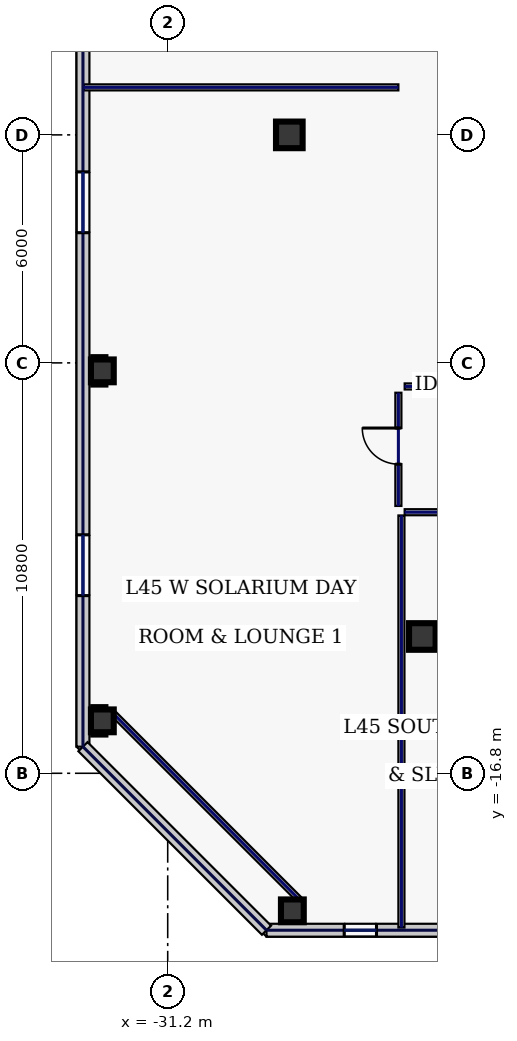
"""IFC4 building model, lengths in metres.
Left out: names, types, materials, properties, quantities, classifications, styles, units other than length and angle.
Written with IfcOpenShell. Run it as: python <this file> out.ifc"""

import sys

from ifc_helpers import new_model, si_unit, direction, frame, frame_2d, origin, origin_2d, place, context, subcontext, project, spatial, rectangle, hollow_rectangle, extrude, element, fill, save


model = new_model("IFC4")
c1 = context("Model", 3, precision=1e-05, world=origin(), true_north=direction((0.0, 1.0)))
c2 = subcontext(c1, "Body", "Model", "MODEL_VIEW")
j1 = project(units=[si_unit("LENGTHUNIT", "METRE"), si_unit("PLANEANGLEUNIT", "RADIAN")], contexts=[c1])
p1 = place(None, origin())
s1 = spatial("IfcSite", under=j1, at=p1, CompositionType="ELEMENT")
p2 = place(p1, origin())
s2 = spatial("IfcBuilding", under=s1, at=p2, CompositionType="ELEMENT")
p3 = place(p2, frame((0.0, 0.0, 196.2)))
s3 = spatial("IfcBuildingStorey", under=s2, at=p3, CompositionType="ELEMENT", Elevation=196.2)
for number, where, z_axis, x_axis in (
    (1, (-24.5, -13.2, 0.0), (0.0, 0.0, 1.0), (1.0, 0.0, 0.0)),
    (2, (-28.0, 0.0, 0.0), (0.0, 0.0, 1.0), (1.0, 0.0, 0.0)),
):
    element("IfcColumn", number, at=place(p3, frame(where, z_axis=z_axis, x_axis=x_axis)), inside=s3, PredefinedType="COLUMN", context=c2, shape_type="SweptSolid", body=[
        extrude(hollow_rectangle(XDim=0.7, YDim=0.7, WallThickness=0.032, at=origin_2d()), origin(), (0.0, 0.0, 1.0), 3.74),
    ])
for number, where, z_axis, x_axis in (
    (3, (-27.92, -20.42, 0.0), (0.0, 0.0, 1.0), (1.0, 0.0, 0.0)),
    (4, (-32.92, -6.21, 0.0), (0.0, 0.0, 1.0), (1.0, 0.0, 0.0)),
    (5, (-32.92, -15.42, 0.0), (0.0, 0.0, 1.0), (1.0, 0.0, 0.0)),
):
    element("IfcColumn", number, at=place(p3, frame(where, z_axis=z_axis, x_axis=x_axis)), inside=s3, PredefinedType="COLUMN", context=c2, shape_type="SweptSolid", body=[
        extrude(hollow_rectangle(XDim=0.6, YDim=0.6, WallThickness=0.028, at=origin_2d()), origin(), (0.0, 0.0, 1.0), 3.74),
    ])
p4 = place(p3, frame((-28.6, -20.93, 0.0), z_axis=(0.0, 0.0, 1.0), x_axis=(1.0, 0.0, 0.0)))
e6 = element("IfcWall", 6, at=p4, inside=s3, PredefinedType="STANDARD", context=c2, shape_type="SweptSolid", body=[
    extrude(rectangle(XDim=19.937, YDim=0.34, at=frame_2d((9.969, 0.0))), origin(), (0.0, 0.0, 1.0), 3.74),
])
p5 = place(p4, frame((2.044, 0.0, 0.8)))
e7 = element("IfcOpeningElement", 7, at=p5, cuts=e6, PredefinedType="OPENING", context=c2, shape_type="SweptSolid", body=[
    extrude(rectangle(XDim=0.85, YDim=1.85, at=frame_2d((0.425, 0.925))), frame((0.0, 0.18, 0.0), z_axis=(0.0, -1.0, 0.0), x_axis=(1.0, 0.0, 0.0)), (0.0, 0.0, 1.0), 0.36),
])
p6 = place(p4, frame((6.029, 0.0, 0.8)))
e8 = element("IfcOpeningElement", 8, at=p6, cuts=e6, PredefinedType="OPENING", context=c2, shape_type="SweptSolid", body=[
    extrude(rectangle(XDim=0.85, YDim=1.85, at=frame_2d((0.425, 0.925))), frame((0.0, 0.18, 0.0), z_axis=(0.0, -1.0, 0.0), x_axis=(1.0, 0.0, 0.0)), (0.0, 0.0, 1.0), 0.36),
])
p7 = place(p4, frame((10.707, 0.0, 0.8)))
e9 = element("IfcOpeningElement", 9, at=p7, cuts=e6, PredefinedType="OPENING", context=c2, shape_type="SweptSolid", body=[
    extrude(rectangle(XDim=1.95, YDim=2.1, at=frame_2d((0.975, 1.05))), frame((0.0, 0.18, 0.0), z_axis=(0.0, -1.0, 0.0), x_axis=(1.0, 0.0, 0.0)), (0.0, 0.0, 1.0), 0.36),
])
p8 = place(p3, frame((-33.43, 22.1, 0.0), z_axis=(0.0, 0.0, 1.0), x_axis=(0.0, -1.0, 0.0)))
e10 = element("IfcWall", 10, at=p8, inside=s3, PredefinedType="STANDARD", context=c2, shape_type="SweptSolid", body=[
    extrude(rectangle(XDim=38.2, YDim=0.34, at=frame_2d((19.1, 0.0))), origin(), (0.0, 0.0, 1.0), 3.74),
])
p9 = place(p8, frame((3.975, 0.0, 0.58)))
e11 = element("IfcOpeningElement", 11, at=p9, cuts=e10, PredefinedType="OPENING", context=c2, shape_type="SweptSolid", body=[
    extrude(rectangle(XDim=1.6, YDim=2.3, at=frame_2d((0.8, 1.15))), frame((0.0, 0.18, 0.0), z_axis=(0.0, -1.0, 0.0), x_axis=(1.0, 0.0, 0.0)), (0.0, 0.0, 1.0), 0.36),
])
p10 = place(p8, frame((13.525, 0.0, 0.58)))
e12 = element("IfcOpeningElement", 12, at=p10, cuts=e10, PredefinedType="OPENING", context=c2, shape_type="SweptSolid", body=[
    extrude(rectangle(XDim=1.6, YDim=2.3, at=frame_2d((0.8, 1.15))), frame((0.0, 0.18, 0.0), z_axis=(0.0, -1.0, 0.0), x_axis=(1.0, 0.0, 0.0)), (0.0, 0.0, 1.0), 0.36),
])
p11 = place(p8, frame((23.075, 0.0, 0.58)))
e13 = element("IfcOpeningElement", 13, at=p11, cuts=e10, PredefinedType="OPENING", context=c2, shape_type="SweptSolid", body=[
    extrude(rectangle(XDim=1.6, YDim=2.3, at=frame_2d((0.8, 1.15))), frame((0.0, 0.18, 0.0), z_axis=(0.0, -1.0, 0.0), x_axis=(1.0, 0.0, 0.0)), (0.0, 0.0, 1.0), 0.36),
])
p12 = place(p8, frame((32.625, 0.0, 0.58)))
e14 = element("IfcOpeningElement", 14, at=p12, cuts=e10, PredefinedType="OPENING", context=c2, shape_type="SweptSolid", body=[
    extrude(rectangle(XDim=1.6, YDim=2.3, at=frame_2d((0.8, 1.15))), frame((0.0, 0.18, 0.0), z_axis=(0.0, -1.0, 0.0), x_axis=(1.0, 0.0, 0.0)), (0.0, 0.0, 1.0), 0.36),
])
p13 = place(p3, frame((-33.43, -16.1, 0.0), z_axis=(0.0, 0.0, 1.0), x_axis=(0.707106781187, -0.707106781187, 0.0)))
e15 = element("IfcWall", 15, at=p13, inside=s3, PredefinedType="STANDARD", context=c2, shape_type="SweptSolid", body=[
    extrude(rectangle(XDim=6.83, YDim=0.34, at=frame_2d((3.415, 0.0))), origin(), (0.0, 0.0, 1.0), 3.74),
])
p14 = place(p3, frame((-32.68, -15.18, 0.0), z_axis=(0.0, 0.0, 1.0), x_axis=(0.707106781187, -0.707106781187, 0.0)))
e16 = element("IfcWall", 16, at=p14, inside=s3, PredefinedType="PARTITIONING", context=c2, shape_type="SweptSolid", body=[
    extrude(rectangle(XDim=7.071, YDim=0.16, at=frame_2d((3.536, 0.0))), origin(), (0.0, 0.0, 1.0), 3.74),
])
p15 = place(p3, frame((-25.13, -9.765, 0.0), z_axis=(0.0, 0.0, 1.0), x_axis=(0.0, 1.0, 0.0)))
e17 = element("IfcWall", 17, at=p15, inside=s3, PredefinedType="PARTITIONING", context=c2, shape_type="SweptSolid", body=[
    extrude(rectangle(XDim=2.98, YDim=0.16, at=frame_2d((1.49, 0.0))), origin(), (0.0, 0.0, 1.0), 3.74),
])
p16 = place(p15, frame((1.1, 0.0, 0.0)))
e18 = element("IfcOpeningElement", 18, at=p16, cuts=e17, PredefinedType="OPENING", context=c2, shape_type="SweptSolid", body=[
    extrude(rectangle(XDim=0.95, YDim=2.2, at=frame_2d((0.475, 1.1))), frame((0.0, 0.09, 0.0), z_axis=(0.0, -1.0, 0.0), x_axis=(1.0, 0.0, 0.0)), (0.0, 0.0, 1.0), 0.18),
])
p17 = place(p3, frame((-24.965, -6.62, 0.0), z_axis=(0.0, 0.0, 1.0), x_axis=(1.0, 0.0, 0.0)))
e19 = element("IfcWall", 19, at=p17, inside=s3, PredefinedType="PARTITIONING", context=c2, shape_type="SweptSolid", body=[
    extrude(rectangle(XDim=14.335, YDim=0.16, at=frame_2d((7.167, 0.0))), origin(), (0.0, 0.0, 1.0), 3.74),
])
p18 = place(p3, frame((24.965, -9.93, 0.0), z_axis=(0.0, 0.0, 1.0), x_axis=(-1.0, 0.0, 0.0)))
e20 = element("IfcWall", 20, at=p18, inside=s3, PredefinedType="PARTITIONING", context=c2, shape_type="SweptSolid", body=[
    extrude(rectangle(XDim=49.93, YDim=0.16, at=frame_2d((24.965, 0.0))), origin(), (0.0, 0.0, 1.0), 3.74),
])
p19 = place(p18, frame((47.106, 0.0, 0.0)))
e21 = element("IfcOpeningElement", 21, at=p19, cuts=e20, PredefinedType="OPENING", context=c2, shape_type="SweptSolid", body=[
    extrude(rectangle(XDim=0.95, YDim=2.2, at=frame_2d((0.475, 1.1))), frame((0.0, 0.09, 0.0), z_axis=(0.0, -1.0, 0.0), x_axis=(1.0, 0.0, 0.0)), (0.0, 0.0, 1.0), 0.18),
])
p20 = place(p18, frame((41.375, 0.0, 0.0)))
e22 = element("IfcOpeningElement", 22, at=p20, cuts=e20, PredefinedType="OPENING", context=c2, shape_type="SweptSolid", body=[
    extrude(rectangle(XDim=0.95, YDim=2.2, at=frame_2d((0.475, 1.1))), frame((0.0, 0.09, 0.0), z_axis=(0.0, -1.0, 0.0), x_axis=(1.0, 0.0, 0.0)), (0.0, 0.0, 1.0), 0.18),
])
p21 = place(p18, frame((33.875, 0.0, 0.0)))
e23 = element("IfcOpeningElement", 23, at=p21, cuts=e20, PredefinedType="OPENING", context=c2, shape_type="SweptSolid", body=[
    extrude(rectangle(XDim=0.95, YDim=2.2, at=frame_2d((0.475, 1.1))), frame((0.0, 0.09, 0.0), z_axis=(0.0, -1.0, 0.0), x_axis=(1.0, 0.0, 0.0)), (0.0, 0.0, 1.0), 0.18),
])
p22 = place(p18, frame((25.3, 0.0, 0.0)))
e24 = element("IfcOpeningElement", 24, at=p22, cuts=e20, PredefinedType="OPENING", context=c2, shape_type="SweptSolid", body=[
    extrude(rectangle(XDim=1.3, YDim=2.2, at=frame_2d((0.65, 1.1))), frame((0.0, 0.09, 0.0), z_axis=(0.0, -1.0, 0.0), x_axis=(1.0, 0.0, 0.0)), (0.0, 0.0, 1.0), 0.18),
])
p23 = place(p18, frame((16.4, 0.0, 0.0)))
e25 = element("IfcOpeningElement", 25, at=p23, cuts=e20, PredefinedType="OPENING", context=c2, shape_type="SweptSolid", body=[
    extrude(rectangle(XDim=1.3, YDim=2.2, at=frame_2d((0.65, 1.1))), frame((0.0, 0.09, 0.0), z_axis=(0.0, -1.0, 0.0), x_axis=(1.0, 0.0, 0.0)), (0.0, 0.0, 1.0), 0.18),
])
p24 = place(p18, frame((8.475, 0.0, 0.0)))
e26 = element("IfcOpeningElement", 26, at=p24, cuts=e20, PredefinedType="OPENING", context=c2, shape_type="SweptSolid", body=[
    extrude(rectangle(XDim=0.95, YDim=2.2, at=frame_2d((0.475, 1.1))), frame((0.0, 0.09, 0.0), z_axis=(0.0, -1.0, 0.0), x_axis=(1.0, 0.0, 0.0)), (0.0, 0.0, 1.0), 0.18),
])
p25 = place(p18, frame((2.344, 0.0, 0.0)))
e27 = element("IfcOpeningElement", 27, at=p25, cuts=e20, PredefinedType="OPENING", context=c2, shape_type="SweptSolid", body=[
    extrude(rectangle(XDim=0.95, YDim=2.2, at=frame_2d((0.475, 1.1))), frame((0.0, 0.09, 0.0), z_axis=(0.0, -1.0, 0.0), x_axis=(1.0, 0.0, 0.0)), (0.0, 0.0, 1.0), 0.18),
])
p26 = place(p3, frame((-25.05, -20.86, 0.0), z_axis=(0.0, 0.0, 1.0), x_axis=(0.0, 1.0, 0.0)))
e28 = element("IfcWall", 28, at=p26, inside=s3, PredefinedType="PARTITIONING", context=c2, shape_type="SweptSolid", body=[
    extrude(rectangle(XDim=10.845, YDim=0.16, at=frame_2d((5.423, 0.0))), origin(), (0.0, 0.0, 1.0), 3.74),
])
p27 = place(p3, frame((-33.41, 1.25, 0.0), z_axis=(0.0, 0.0, 1.0), x_axis=(1.0, 0.0, 0.0)))
e29 = element("IfcWall", 29, at=p27, inside=s3, PredefinedType="PARTITIONING", context=c2, shape_type="SweptSolid", body=[
    extrude(rectangle(XDim=8.28, YDim=0.16, at=frame_2d((4.14, 0.0))), origin(), (0.0, 0.0, 1.0), 3.74),
])
p28 = place(p5, origin())
e30 = element("IfcWindow", 30, at=p28, inside=s3, PartitioningType="SINGLE_PANEL", PredefinedType="WINDOW", context=c2, shape_type="SweptSolid", body=[
    extrude(rectangle(XDim=0.85, YDim=1.85, at=frame_2d((0.425, 0.925))), frame((0.0, 0.03, 0.0), z_axis=(0.0, -1.0, 0.0), x_axis=(1.0, 0.0, 0.0)), (0.0, 0.0, 1.0), 0.06),
])
fill(e7, e30)
p29 = place(p11, origin())
e31 = element("IfcWindow", 31, at=p29, inside=s3, PartitioningType="SINGLE_PANEL", PredefinedType="WINDOW", context=c2, shape_type="SweptSolid", body=[
    extrude(rectangle(XDim=1.6, YDim=2.3, at=frame_2d((0.8, 1.15))), frame((0.0, 0.03, 0.0), z_axis=(0.0, -1.0, 0.0), x_axis=(1.0, 0.0, 0.0)), (0.0, 0.0, 1.0), 0.06),
])
fill(e13, e31)
p30 = place(p12, origin())
e32 = element("IfcWindow", 32, at=p30, inside=s3, PartitioningType="SINGLE_PANEL", PredefinedType="WINDOW", context=c2, shape_type="SweptSolid", body=[
    extrude(rectangle(XDim=1.6, YDim=2.3, at=frame_2d((0.8, 1.15))), frame((0.0, 0.03, 0.0), z_axis=(0.0, -1.0, 0.0), x_axis=(1.0, 0.0, 0.0)), (0.0, 0.0, 1.0), 0.06),
])
fill(e14, e32)
p31 = place(p16, origin())
e33 = element("IfcDoor", 33, at=p31, inside=s3, OperationType="SINGLE_SWING_RIGHT", PredefinedType="DOOR", context=c2, shape_type="SweptSolid", body=[
    extrude(rectangle(XDim=0.95, YDim=2.2, at=frame_2d((0.475, 1.1))), frame((0.0, 0.025, 0.0), z_axis=(0.0, -1.0, 0.0), x_axis=(1.0, 0.0, 0.0)), (0.0, 0.0, 1.0), 0.05),
])
fill(e18, e33)
save(model, sys.argv[1])
